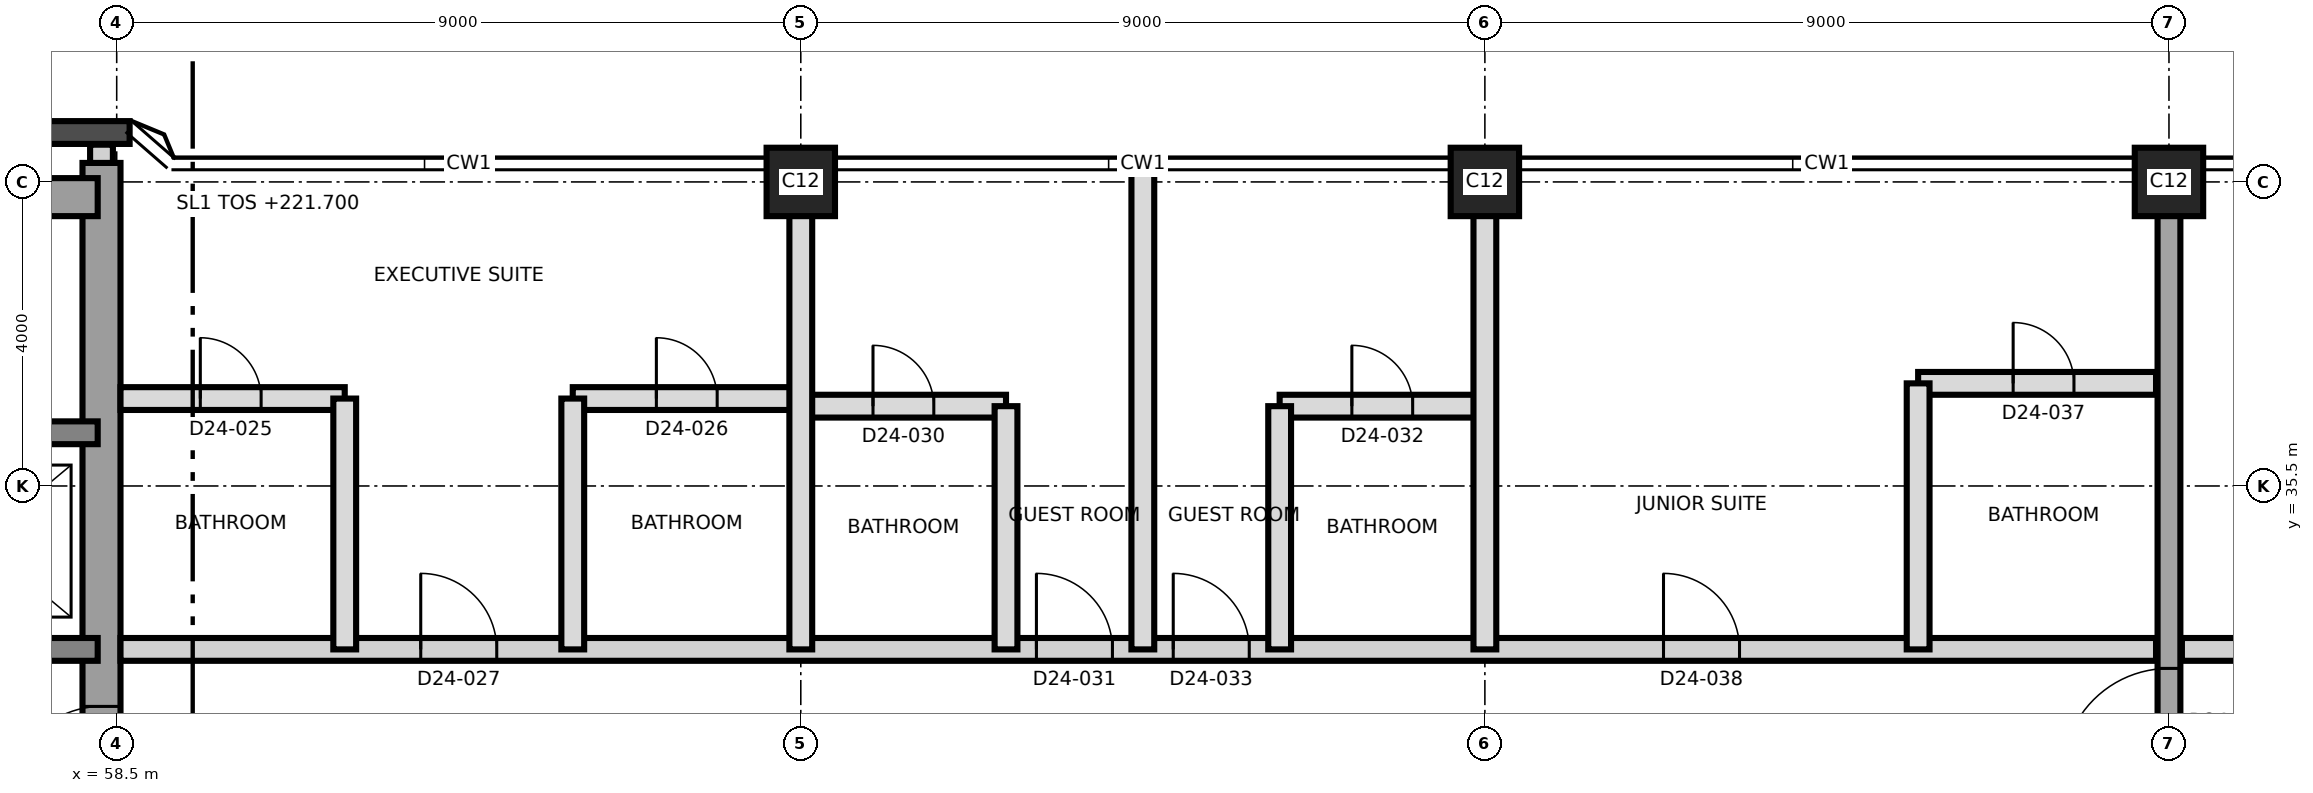
"""IFC4 building model, lengths in metres.
Left out: names, types, materials, properties, quantities, classifications, styles, units other than length and angle.
Written with IfcOpenShell. Run it as: python <this file> out.ifc"""

import sys

from ifc_helpers import new_model, si_unit, direction, frame, frame_2d, origin, origin_2d, place, context, subcontext, project, spatial, rectangle, extrude, element, fill, save


model = new_model("IFC4")
c1 = context("Model", 3, precision=1e-05, world=origin(), true_north=direction((0.0, 1.0)))
c2 = subcontext(c1, "Body", "Model", "MODEL_VIEW")
j1 = project(units=[si_unit("LENGTHUNIT", "METRE"), si_unit("PLANEANGLEUNIT", "RADIAN")], contexts=[c1])
p1 = place(None, origin())
s1 = spatial("IfcSite", under=j1, at=p1, CompositionType="ELEMENT")
p2 = place(p1, origin())
s2 = spatial("IfcBuilding", under=s1, at=p2, CompositionType="ELEMENT")
p3 = place(p2, frame((0.0, 0.0, 221.7)))
s3 = spatial("IfcBuildingStorey", under=s2, at=p3, CompositionType="ELEMENT", Elevation=221.7)
p4 = place(p3, frame((58.3, 21.25, 0.0), z_axis=(0.0, 0.0, 1.0), x_axis=(0.0, 1.0, 0.0)))
e1 = element("IfcWall", 1, at=p4, inside=s3, PredefinedType="SHEAR", context=c2, shape_type="SweptSolid", body=[
    extrude(rectangle(XDim=18.5, YDim=0.5, at=frame_2d((9.25, 0.0))), origin(), (0.0, 0.0, 1.0), 3.7),
])
p5 = place(p4, frame((10.15, 0.0, 0.0)))
e2 = element("IfcOpeningElement", 2, at=p5, cuts=e1, PredefinedType="OPENING", context=c2, shape_type="SweptSolid", body=[
    extrude(rectangle(XDim=1.2, YDim=2.1, at=frame_2d((0.6, 1.05))), frame((0.0, 0.26, 0.0), z_axis=(0.0, -1.0, 0.0), x_axis=(1.0, 0.0, 0.0)), (0.0, 0.0, 1.0), 0.52),
])
p6 = place(p3, frame((31.25, 39.3, 0.0), z_axis=(0.0, 0.0, 1.0), x_axis=(1.0, 0.0, 0.0)))
e3 = element("IfcWall", 3, at=p6, inside=s3, PredefinedType="SHEAR", context=c2, shape_type="SweptSolid", body=[
    extrude(rectangle(XDim=27.0, YDim=0.5, at=frame_2d((13.5, 0.0))), origin(), (0.0, 0.0, 1.0), 3.7),
])
p7 = place(p6, frame((10.45, 0.0, 0.0)))
e4 = element("IfcOpeningElement", 4, at=p7, cuts=e3, PredefinedType="OPENING", context=c2, shape_type="SweptSolid", body=[
    extrude(rectangle(XDim=1.2, YDim=2.1, at=frame_2d((0.6, 1.05))), frame((0.0, 0.26, 0.0), z_axis=(0.0, -1.0, 0.0), x_axis=(1.0, 0.0, 0.0)), (0.0, 0.0, 1.0), 0.52),
])
p8 = place(p3, frame((31.75, 33.35, 0.0), z_axis=(0.0, 0.0, 1.0), x_axis=(1.0, 0.0, 0.0)))
e5 = element("IfcWall", 5, at=p8, inside=s3, PredefinedType="SHEAR", context=c2, shape_type="SweptSolid", body=[
    extrude(rectangle(XDim=26.5, YDim=0.3, at=frame_2d((13.25, 0.0))), origin(), (0.0, 0.0, 1.0), 3.7),
])
p9 = place(p8, frame((13.9, 0.0, 0.0)))
e6 = element("IfcOpeningElement", 6, at=p9, cuts=e5, PredefinedType="OPENING", context=c2, shape_type="SweptSolid", body=[
    extrude(rectangle(XDim=1.4, YDim=2.1, at=frame_2d((0.7, 1.05))), frame((0.0, 0.16, 0.0), z_axis=(0.0, -1.0, 0.0), x_axis=(1.0, 0.0, 0.0)), (0.0, 0.0, 1.0), 0.32),
])
p10 = place(p8, frame((5.375, 0.0, 0.0)))
e7 = element("IfcOpeningElement", 7, at=p10, cuts=e5, PredefinedType="OPENING", context=c2, shape_type="SweptSolid", body=[
    extrude(rectangle(XDim=1.2, YDim=2.1, at=frame_2d((0.6, 1.05))), frame((0.0, 0.16, 0.0), z_axis=(0.0, -1.0, 0.0), x_axis=(1.0, 0.0, 0.0)), (0.0, 0.0, 1.0), 0.32),
])
p11 = place(p8, frame((19.925, 0.0, 0.0)))
e8 = element("IfcOpeningElement", 8, at=p11, cuts=e5, PredefinedType="OPENING", context=c2, shape_type="SweptSolid", body=[
    extrude(rectangle(XDim=1.2, YDim=2.1, at=frame_2d((0.6, 1.05))), frame((0.0, 0.16, 0.0), z_axis=(0.0, -1.0, 0.0), x_axis=(1.0, 0.0, 0.0)), (0.0, 0.0, 1.0), 0.32),
])
p12 = place(p3, frame((43.5, 36.2, 0.0), z_axis=(0.0, 0.0, 1.0), x_axis=(1.0, 0.0, 0.0)))
e9 = element("IfcWall", 9, at=p12, inside=s3, PredefinedType="SHEAR", context=c2, shape_type="SweptSolid", body=[
    extrude(rectangle(XDim=14.75, YDim=0.3, at=frame_2d((7.375, 0.0))), origin(), (0.0, 0.0, 1.0), 3.7),
])
p13 = place(p12, frame((6.9, 0.0, 0.0)))
e10 = element("IfcOpeningElement", 10, at=p13, cuts=e9, PredefinedType="OPENING", context=c2, shape_type="SweptSolid", body=[
    extrude(rectangle(XDim=1.2, YDim=2.1, at=frame_2d((0.6, 1.05))), frame((0.0, 0.16, 0.0), z_axis=(0.0, -1.0, 0.0), x_axis=(1.0, 0.0, 0.0)), (0.0, 0.0, 1.0), 0.32),
])
p14 = place(p12, frame((0.7, 0.0, 0.0)))
e11 = element("IfcOpeningElement", 11, at=p14, cuts=e9, PredefinedType="OPENING", context=c2, shape_type="SweptSolid", body=[
    extrude(rectangle(XDim=1.3, YDim=2.4, at=frame_2d((0.65, 1.2))), frame((0.0, 0.16, 0.0), z_axis=(0.0, -1.0, 0.0), x_axis=(1.0, 0.0, 0.0)), (0.0, 0.0, 1.0), 0.32),
])
p15 = place(p12, frame((3.7, 0.0, 0.0)))
e12 = element("IfcOpeningElement", 12, at=p15, cuts=e9, PredefinedType="OPENING", context=c2, shape_type="SweptSolid", body=[
    extrude(rectangle(XDim=1.3, YDim=2.4, at=frame_2d((0.65, 1.2))), frame((0.0, 0.16, 0.0), z_axis=(0.0, -1.0, 0.0), x_axis=(1.0, 0.0, 0.0)), (0.0, 0.0, 1.0), 0.32),
])
for number, where, z_axis, x_axis in (
    (13, (67.5, 39.5, 0.0), (0.0, 0.0, 1.0), (1.0, 0.0, 0.0)),
    (14, (76.5, 39.5, 0.0), (0.0, 0.0, 1.0), (1.0, 0.0, 0.0)),
    (15, (85.5, 39.5, 0.0), (0.0, 0.0, 1.0), (1.0, 0.0, 0.0)),
):
    element("IfcColumn", number, at=place(p3, frame(where, z_axis=z_axis, x_axis=x_axis)), inside=s3, PredefinedType="COLUMN", context=c2, shape_type="SweptSolid", body=[
        extrude(rectangle(XDim=0.9, YDim=0.9, at=origin_2d()), origin(), (0.0, 0.0, 1.0), 3.7),
    ])
p16 = place(p3, frame((85.5, 21.53, 0.0), z_axis=(0.0, 0.0, 1.0), x_axis=(0.0, 1.0, 0.0)))
e16 = element("IfcWall", 16, at=p16, inside=s3, PredefinedType="SHEAR", context=c2, shape_type="SweptSolid", body=[
    extrude(rectangle(XDim=17.94, YDim=0.3, at=frame_2d((8.97, 0.0))), origin(), (0.0, 0.0, 1.0), 3.7),
])
p17 = place(p16, frame((10.17, 0.0, 0.0)))
e17 = element("IfcOpeningElement", 17, at=p17, cuts=e16, PredefinedType="OPENING", context=c2, shape_type="SweptSolid", body=[
    extrude(rectangle(XDim=1.4, YDim=2.1, at=frame_2d((0.7, 1.05))), frame((0.0, 0.16, 0.0), z_axis=(0.0, -1.0, 0.0), x_axis=(1.0, 0.0, 0.0)), (0.0, 0.0, 1.0), 0.32),
])
p18 = place(p3, frame((58.67, 40.15, 0.0), z_axis=(0.0, 0.0, 1.0), x_axis=(-1.0, 0.0, 0.0)))
e18 = element("IfcWall", 18, at=p18, inside=s3, PredefinedType="SOLIDWALL", context=c2, shape_type="SweptSolid", body=[
    extrude(rectangle(XDim=5.341, YDim=0.3, at=frame_2d((2.67, 0.0))), origin(), (0.0, 0.0, 1.0), 3.4),
])
p19 = place(p3, frame((58.55, 33.35, 0.0), z_axis=(0.0, 0.0, 1.0), x_axis=(1.0, 0.0, 0.0)))
e19 = element("IfcWall", 19, at=p19, inside=s3, PredefinedType="PARTITIONING", context=c2, shape_type="SweptSolid", body=[
    extrude(rectangle(XDim=26.78, YDim=0.3, at=frame_2d((13.39, 0.0))), origin(), (0.0, 0.0, 1.0), 3.4),
])
p20 = place(p19, frame((3.95, 0.0, 0.0)))
e20 = element("IfcOpeningElement", 20, at=p20, cuts=e19, PredefinedType="OPENING", context=c2, shape_type="SweptSolid", body=[
    extrude(rectangle(XDim=1.0, YDim=2.4, at=frame_2d((0.5, 1.2))), frame((0.0, 0.16, 0.0), z_axis=(0.0, -1.0, 0.0), x_axis=(1.0, 0.0, 0.0)), (0.0, 0.0, 1.0), 0.32),
])
p21 = place(p19, frame((12.05, 0.0, 0.0)))
e21 = element("IfcOpeningElement", 21, at=p21, cuts=e19, PredefinedType="OPENING", context=c2, shape_type="SweptSolid", body=[
    extrude(rectangle(XDim=1.0, YDim=2.1, at=frame_2d((0.5, 1.05))), frame((0.0, 0.16, 0.0), z_axis=(0.0, -1.0, 0.0), x_axis=(1.0, 0.0, 0.0)), (0.0, 0.0, 1.0), 0.32),
])
p22 = place(p19, frame((13.85, 0.0, 0.0)))
e22 = element("IfcOpeningElement", 22, at=p22, cuts=e19, PredefinedType="OPENING", context=c2, shape_type="SweptSolid", body=[
    extrude(rectangle(XDim=1.0, YDim=2.1, at=frame_2d((0.5, 1.05))), frame((0.0, 0.16, 0.0), z_axis=(0.0, -1.0, 0.0), x_axis=(1.0, 0.0, 0.0)), (0.0, 0.0, 1.0), 0.32),
])
p23 = place(p19, frame((20.3, 0.0, 0.0)))
e23 = element("IfcOpeningElement", 23, at=p23, cuts=e19, PredefinedType="OPENING", context=c2, shape_type="SweptSolid", body=[
    extrude(rectangle(XDim=1.0, YDim=2.4, at=frame_2d((0.5, 1.2))), frame((0.0, 0.16, 0.0), z_axis=(0.0, -1.0, 0.0), x_axis=(1.0, 0.0, 0.0)), (0.0, 0.0, 1.0), 0.32),
])
p24 = place(p3, frame((85.67, 33.35, 0.0), z_axis=(0.0, 0.0, 1.0), x_axis=(1.0, 0.0, 0.0)))
e24 = element("IfcWall", 24, at=p24, inside=s3, PredefinedType="PARTITIONING", context=c2, shape_type="SweptSolid", body=[
    extrude(rectangle(XDim=8.685, YDim=0.3, at=frame_2d((4.343, 0.0))), origin(), (0.0, 0.0, 1.0), 3.4),
])
p25 = place(p24, frame((1.83, 0.0, 0.0)))
e25 = element("IfcOpeningElement", 25, at=p25, cuts=e24, PredefinedType="OPENING", context=c2, shape_type="SweptSolid", body=[
    extrude(rectangle(XDim=1.0, YDim=2.1, at=frame_2d((0.5, 1.05))), frame((0.0, 0.16, 0.0), z_axis=(0.0, -1.0, 0.0), x_axis=(1.0, 0.0, 0.0)), (0.0, 0.0, 1.0), 0.32),
])
p26 = place(p24, frame((5.63, 0.0, 0.0)))
e26 = element("IfcOpeningElement", 26, at=p26, cuts=e24, PredefinedType="OPENING", context=c2, shape_type="SweptSolid", body=[
    extrude(rectangle(XDim=1.0, YDim=2.1, at=frame_2d((0.5, 1.05))), frame((0.0, 0.16, 0.0), z_axis=(0.0, -1.0, 0.0), x_axis=(1.0, 0.0, 0.0)), (0.0, 0.0, 1.0), 0.32),
])
p27 = place(p3, frame((67.5, 36.55, 0.0), z_axis=(0.0, 0.0, 1.0), x_axis=(1.0, 0.0, 0.0)))
e27 = element("IfcWall", 27, at=p27, inside=s3, PredefinedType="PARTITIONING", context=c2, shape_type="SweptSolid", body=[
    extrude(rectangle(XDim=2.7, YDim=0.3, at=frame_2d((1.35, 0.0))), origin(), (0.0, 0.0, 1.0), 3.4),
])
p28 = place(p27, frame((0.95, 0.0, 0.0)))
e28 = element("IfcOpeningElement", 28, at=p28, cuts=e27, PredefinedType="OPENING", context=c2, shape_type="SweptSolid", body=[
    extrude(rectangle(XDim=0.8, YDim=2.1, at=frame_2d((0.4, 1.05))), frame((0.0, 0.16, 0.0), z_axis=(0.0, -1.0, 0.0), x_axis=(1.0, 0.0, 0.0)), (0.0, 0.0, 1.0), 0.32),
])
p29 = place(p3, frame((73.8, 36.55, 0.0), z_axis=(0.0, 0.0, 1.0), x_axis=(1.0, 0.0, 0.0)))
e29 = element("IfcWall", 29, at=p29, inside=s3, PredefinedType="PARTITIONING", context=c2, shape_type="SweptSolid", body=[
    extrude(rectangle(XDim=2.7, YDim=0.3, at=frame_2d((1.35, 0.0))), origin(), (0.0, 0.0, 1.0), 3.4),
])
p30 = place(p29, frame((0.95, 0.0, 0.0)))
e30 = element("IfcOpeningElement", 30, at=p30, cuts=e29, PredefinedType="OPENING", context=c2, shape_type="SweptSolid", body=[
    extrude(rectangle(XDim=0.8, YDim=2.1, at=frame_2d((0.4, 1.05))), frame((0.0, 0.16, 0.0), z_axis=(0.0, -1.0, 0.0), x_axis=(1.0, 0.0, 0.0)), (0.0, 0.0, 1.0), 0.32),
])
p31 = place(p3, frame((58.55, 36.65, 0.0), z_axis=(0.0, 0.0, 1.0), x_axis=(1.0, 0.0, 0.0)))
e31 = element("IfcWall", 31, at=p31, inside=s3, PredefinedType="PARTITIONING", context=c2, shape_type="SweptSolid", body=[
    extrude(rectangle(XDim=2.95, YDim=0.3, at=frame_2d((1.475, 0.0))), origin(), (0.0, 0.0, 1.0), 3.4),
])
p32 = place(p31, frame((1.05, 0.0, 0.0)))
e32 = element("IfcOpeningElement", 32, at=p32, cuts=e31, PredefinedType="OPENING", context=c2, shape_type="SweptSolid", body=[
    extrude(rectangle(XDim=0.8, YDim=2.1, at=frame_2d((0.4, 1.05))), frame((0.0, 0.16, 0.0), z_axis=(0.0, -1.0, 0.0), x_axis=(1.0, 0.0, 0.0)), (0.0, 0.0, 1.0), 0.32),
])
p33 = place(p3, frame((64.5, 36.65, 0.0), z_axis=(0.0, 0.0, 1.0), x_axis=(1.0, 0.0, 0.0)))
e33 = element("IfcWall", 33, at=p33, inside=s3, PredefinedType="PARTITIONING", context=c2, shape_type="SweptSolid", body=[
    extrude(rectangle(XDim=3.0, YDim=0.3, at=frame_2d((1.5, 0.0))), origin(), (0.0, 0.0, 1.0), 3.4),
])
p34 = place(p33, frame((1.1, 0.0, 0.0)))
e34 = element("IfcOpeningElement", 34, at=p34, cuts=e33, PredefinedType="OPENING", context=c2, shape_type="SweptSolid", body=[
    extrude(rectangle(XDim=0.8, YDim=2.1, at=frame_2d((0.4, 1.05))), frame((0.0, 0.16, 0.0), z_axis=(0.0, -1.0, 0.0), x_axis=(1.0, 0.0, 0.0)), (0.0, 0.0, 1.0), 0.32),
])
p35 = place(p3, frame((82.2, 36.85, 0.0), z_axis=(0.0, 0.0, 1.0), x_axis=(1.0, 0.0, 0.0)))
e35 = element("IfcWall", 35, at=p35, inside=s3, PredefinedType="PARTITIONING", context=c2, shape_type="SweptSolid", body=[
    extrude(rectangle(XDim=3.13, YDim=0.3, at=frame_2d((1.565, 0.0))), origin(), (0.0, 0.0, 1.0), 3.4),
])
p36 = place(p35, frame((1.25, 0.0, 0.0)))
e36 = element("IfcOpeningElement", 36, at=p36, cuts=e35, PredefinedType="OPENING", context=c2, shape_type="SweptSolid", body=[
    extrude(rectangle(XDim=0.8, YDim=2.1, at=frame_2d((0.4, 1.05))), frame((0.0, 0.16, 0.0), z_axis=(0.0, -1.0, 0.0), x_axis=(1.0, 0.0, 0.0)), (0.0, 0.0, 1.0), 0.32),
])
for number, where, z_axis, x_axis in (
    (37, (61.5, 33.35, 0.0), (0.0, 0.0, 1.0), (0.0, 1.0, 0.0)),
    (38, (64.5, 33.35, 0.0), (0.0, 0.0, 1.0), (0.0, 1.0, 0.0)),
):
    element("IfcWall", number, at=place(p3, frame(where, z_axis=z_axis, x_axis=x_axis)), inside=s3, PredefinedType="PARTITIONING", context=c2, shape_type="SweptSolid", body=[
        extrude(rectangle(XDim=3.3, YDim=0.3, at=frame_2d((1.65, 0.0))), origin(), (0.0, 0.0, 1.0), 3.4),
    ])
p37 = place(p3, frame((67.5, 33.35, 0.0), z_axis=(0.0, 0.0, 1.0), x_axis=(0.0, 1.0, 0.0)))
e39 = element("IfcWall", 39, at=p37, inside=s3, PredefinedType="PARTITIONING", context=c2, shape_type="SweptSolid", body=[
    extrude(rectangle(XDim=6.12, YDim=0.3, at=frame_2d((3.06, 0.0))), origin(), (0.0, 0.0, 1.0), 3.4),
])
p38 = place(p3, frame((70.2, 33.35, 0.0), z_axis=(0.0, 0.0, 1.0), x_axis=(0.0, 1.0, 0.0)))
e40 = element("IfcWall", 40, at=p38, inside=s3, PredefinedType="PARTITIONING", context=c2, shape_type="SweptSolid", body=[
    extrude(rectangle(XDim=3.2, YDim=0.3, at=frame_2d((1.6, 0.0))), origin(), (0.0, 0.0, 1.0), 3.4),
])
p39 = place(p3, frame((72.0, 33.35, 0.0), z_axis=(0.0, 0.0, 1.0), x_axis=(0.0, 1.0, 0.0)))
e41 = element("IfcWall", 41, at=p39, inside=s3, PredefinedType="PARTITIONING", context=c2, shape_type="SweptSolid", body=[
    extrude(rectangle(XDim=6.3, YDim=0.3, at=frame_2d((3.15, 0.0))), origin(), (0.0, 0.0, 1.0), 3.4),
])
p40 = place(p3, frame((73.8, 33.35, 0.0), z_axis=(0.0, 0.0, 1.0), x_axis=(0.0, 1.0, 0.0)))
e42 = element("IfcWall", 42, at=p40, inside=s3, PredefinedType="PARTITIONING", context=c2, shape_type="SweptSolid", body=[
    extrude(rectangle(XDim=3.2, YDim=0.3, at=frame_2d((1.6, 0.0))), origin(), (0.0, 0.0, 1.0), 3.4),
])
p41 = place(p3, frame((76.5, 33.35, 0.0), z_axis=(0.0, 0.0, 1.0), x_axis=(0.0, 1.0, 0.0)))
e43 = element("IfcWall", 43, at=p41, inside=s3, PredefinedType="PARTITIONING", context=c2, shape_type="SweptSolid", body=[
    extrude(rectangle(XDim=6.12, YDim=0.3, at=frame_2d((3.06, 0.0))), origin(), (0.0, 0.0, 1.0), 3.4),
])
p42 = place(p3, frame((82.2, 33.35, 0.0), z_axis=(0.0, 0.0, 1.0), x_axis=(0.0, 1.0, 0.0)))
e44 = element("IfcWall", 44, at=p42, inside=s3, PredefinedType="PARTITIONING", context=c2, shape_type="SweptSolid", body=[
    extrude(rectangle(XDim=3.5, YDim=0.3, at=frame_2d((1.75, 0.0))), origin(), (0.0, 0.0, 1.0), 3.4),
])
p43 = place(p3, frame((58.3, 39.75, 0.0), z_axis=(0.0, 0.0, 1.0), x_axis=(0.0, 1.0, 0.0)))
e45 = element("IfcWall", 45, at=p43, inside=s3, PredefinedType="PARTITIONING", context=c2, shape_type="SweptSolid", body=[
    extrude(rectangle(XDim=0.24, YDim=0.3, at=frame_2d((0.12, 0.0))), origin(), (0.0, 0.0, 1.0), 3.4),
])
p44 = place(p5, origin())
e46 = element("IfcDoor", 46, at=p44, inside=s3, OperationType="SINGLE_SWING_LEFT", PredefinedType="DOOR", context=c2, shape_type="SweptSolid", body=[
    extrude(rectangle(XDim=1.2, YDim=2.1, at=frame_2d((0.6, 1.05))), frame((0.0, 0.025, 0.0), z_axis=(0.0, -1.0, 0.0), x_axis=(1.0, 0.0, 0.0)), (0.0, 0.0, 1.0), 0.05),
])
fill(e2, e46)
p45 = place(p32, origin())
e47 = element("IfcDoor", 47, at=p45, inside=s3, OperationType="SINGLE_SWING_LEFT", PredefinedType="DOOR", context=c2, shape_type="SweptSolid", body=[
    extrude(rectangle(XDim=0.8, YDim=2.1, at=frame_2d((0.4, 1.05))), frame((0.0, 0.025, 0.0), z_axis=(0.0, -1.0, 0.0), x_axis=(1.0, 0.0, 0.0)), (0.0, 0.0, 1.0), 0.05),
])
fill(e32, e47)
p46 = place(p34, origin())
e48 = element("IfcDoor", 48, at=p46, inside=s3, OperationType="SINGLE_SWING_RIGHT", PredefinedType="DOOR", context=c2, shape_type="SweptSolid", body=[
    extrude(rectangle(XDim=0.8, YDim=2.1, at=frame_2d((0.4, 1.05))), frame((0.0, 0.025, 0.0), z_axis=(0.0, -1.0, 0.0), x_axis=(1.0, 0.0, 0.0)), (0.0, 0.0, 1.0), 0.05),
])
fill(e34, e48)
p47 = place(p20, origin())
e49 = element("IfcDoor", 49, at=p47, inside=s3, OperationType="SINGLE_SWING_LEFT", PredefinedType="DOOR", context=c2, shape_type="SweptSolid", body=[
    extrude(rectangle(XDim=1.0, YDim=2.4, at=frame_2d((0.5, 1.2))), frame((0.0, 0.025, 0.0), z_axis=(0.0, -1.0, 0.0), x_axis=(1.0, 0.0, 0.0)), (0.0, 0.0, 1.0), 0.05),
])
fill(e20, e49)
p48 = place(p28, origin())
e50 = element("IfcDoor", 50, at=p48, inside=s3, OperationType="SINGLE_SWING_LEFT", PredefinedType="DOOR", context=c2, shape_type="SweptSolid", body=[
    extrude(rectangle(XDim=0.8, YDim=2.1, at=frame_2d((0.4, 1.05))), frame((0.0, 0.025, 0.0), z_axis=(0.0, -1.0, 0.0), x_axis=(1.0, 0.0, 0.0)), (0.0, 0.0, 1.0), 0.05),
])
fill(e28, e50)
p49 = place(p21, origin())
e51 = element("IfcDoor", 51, at=p49, inside=s3, OperationType="SINGLE_SWING_RIGHT", PredefinedType="DOOR", context=c2, shape_type="SweptSolid", body=[
    extrude(rectangle(XDim=1.0, YDim=2.1, at=frame_2d((0.5, 1.05))), frame((0.0, 0.025, 0.0), z_axis=(0.0, -1.0, 0.0), x_axis=(1.0, 0.0, 0.0)), (0.0, 0.0, 1.0), 0.05),
])
fill(e21, e51)
p50 = place(p30, origin())
e52 = element("IfcDoor", 52, at=p50, inside=s3, OperationType="SINGLE_SWING_RIGHT", PredefinedType="DOOR", context=c2, shape_type="SweptSolid", body=[
    extrude(rectangle(XDim=0.8, YDim=2.1, at=frame_2d((0.4, 1.05))), frame((0.0, 0.025, 0.0), z_axis=(0.0, -1.0, 0.0), x_axis=(1.0, 0.0, 0.0)), (0.0, 0.0, 1.0), 0.05),
])
fill(e30, e52)
p51 = place(p22, origin())
e53 = element("IfcDoor", 53, at=p51, inside=s3, OperationType="SINGLE_SWING_LEFT", PredefinedType="DOOR", context=c2, shape_type="SweptSolid", body=[
    extrude(rectangle(XDim=1.0, YDim=2.1, at=frame_2d((0.5, 1.05))), frame((0.0, 0.025, 0.0), z_axis=(0.0, -1.0, 0.0), x_axis=(1.0, 0.0, 0.0)), (0.0, 0.0, 1.0), 0.05),
])
fill(e22, e53)
p52 = place(p36, origin())
e54 = element("IfcDoor", 54, at=p52, inside=s3, OperationType="SINGLE_SWING_LEFT", PredefinedType="DOOR", context=c2, shape_type="SweptSolid", body=[
    extrude(rectangle(XDim=0.8, YDim=2.1, at=frame_2d((0.4, 1.05))), frame((0.0, 0.025, 0.0), z_axis=(0.0, -1.0, 0.0), x_axis=(1.0, 0.0, 0.0)), (0.0, 0.0, 1.0), 0.05),
])
fill(e36, e54)
p53 = place(p23, origin())
e55 = element("IfcDoor", 55, at=p53, inside=s3, OperationType="SINGLE_SWING_LEFT", PredefinedType="DOOR", context=c2, shape_type="SweptSolid", body=[
    extrude(rectangle(XDim=1.0, YDim=2.4, at=frame_2d((0.5, 1.2))), frame((0.0, 0.025, 0.0), z_axis=(0.0, -1.0, 0.0), x_axis=(1.0, 0.0, 0.0)), (0.0, 0.0, 1.0), 0.05),
])
fill(e23, e55)
p54 = place(p17, origin())
e56 = element("IfcDoor", 56, at=p54, inside=s3, OperationType="SINGLE_SWING_RIGHT", PredefinedType="DOOR", context=c2, shape_type="SweptSolid", body=[
    extrude(rectangle(XDim=1.4, YDim=2.1, at=frame_2d((0.7, 1.05))), frame((0.0, 0.025, 0.0), z_axis=(0.0, -1.0, 0.0), x_axis=(1.0, 0.0, 0.0)), (0.0, 0.0, 1.0), 0.05),
])
fill(e17, e56)
save(model, sys.argv[1])
